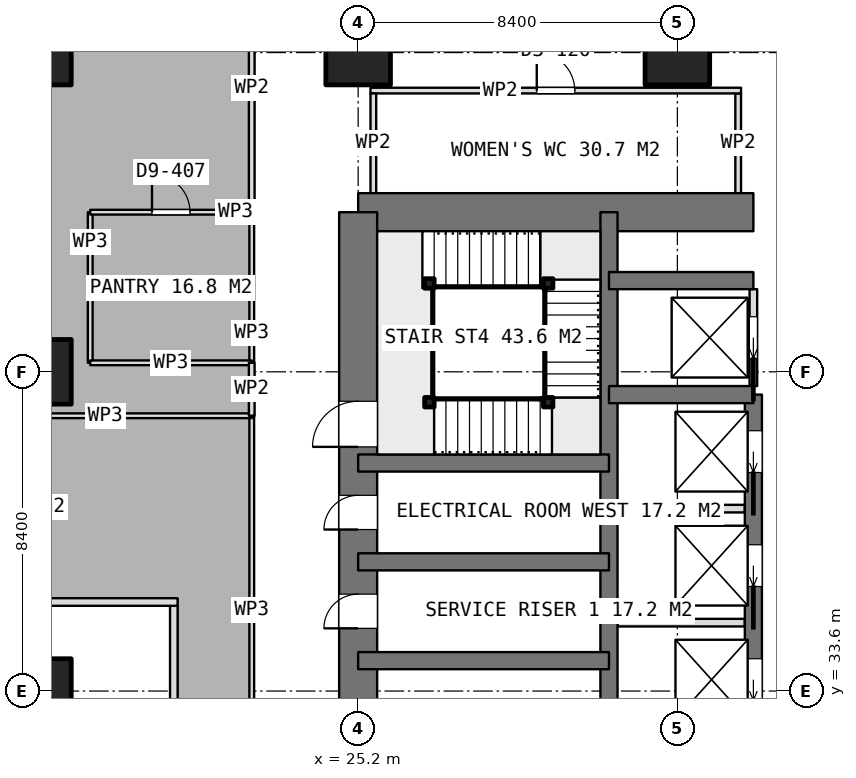
"""IFC4 building model, lengths in metres.
Left out: names, types, materials, properties, quantities, classifications, styles, units other than length and angle.
Written with IfcOpenShell. Run it as: python <this file> out.ifc"""

import sys

from ifc_helpers import new_model, si_unit, direction, frame, frame_2d, origin, origin_2d, place, context, subcontext, project, spatial, rectangle, extrude, element, fill, save


model = new_model("IFC4")
c1 = context("Model", 3, precision=1e-05, world=origin(), true_north=direction((0.0, 1.0)))
c2 = subcontext(c1, "Body", "Model", "MODEL_VIEW")
j1 = project(units=[si_unit("LENGTHUNIT", "METRE"), si_unit("PLANEANGLEUNIT", "RADIAN")], contexts=[c1])
p1 = place(None, origin())
s1 = spatial("IfcSite", under=j1, at=p1, CompositionType="ELEMENT")
p2 = place(p1, origin())
s2 = spatial("IfcBuilding", under=s1, at=p2, CompositionType="ELEMENT")
p3 = place(p2, frame((0.0, 0.0, 114.05)))
s3 = spatial("IfcBuildingStorey", under=s2, at=p3, CompositionType="ELEMENT", Elevation=114.05)
p4 = place(p3, frame((25.2, 46.2, 0.0), z_axis=(0.0, 0.0, 1.0), x_axis=(1.0, 0.0, 0.0)))
e1 = element("IfcWall", 1, at=p4, inside=s3, PredefinedType="SHEAR", context=c2, shape_type="SweptSolid", body=[
    extrude(rectangle(XDim=10.4, YDim=1.0, at=frame_2d((5.2, 0.0))), origin(), (0.0, 0.0, 1.0), 3.75),
])
p5 = place(p3, frame((25.2, 21.0, 0.0), z_axis=(0.0, 0.0, 1.0), x_axis=(0.0, 1.0, 0.0)))
e2 = element("IfcWall", 2, at=p5, inside=s3, PredefinedType="SHEAR", context=c2, shape_type="SweptSolid", body=[
    extrude(rectangle(XDim=25.2, YDim=1.0, at=frame_2d((12.6, 0.0))), origin(), (0.0, 0.0, 1.0), 3.75),
])
p6 = place(p5, frame((7.8, 0.0, 0.0)))
e3 = element("IfcOpeningElement", 3, at=p6, cuts=e2, PredefinedType="OPENING", context=c2, shape_type="SweptSolid", body=[
    extrude(rectangle(XDim=1.2, YDim=2.1, at=frame_2d((0.6, 1.05))), frame((0.0, 0.51, 0.0), z_axis=(0.0, -1.0, 0.0), x_axis=(1.0, 0.0, 0.0)), (0.0, 0.0, 1.0), 1.02),
])
p7 = place(p5, frame((14.25, 0.0, 0.0)))
e4 = element("IfcOpeningElement", 4, at=p7, cuts=e2, PredefinedType="OPENING", context=c2, shape_type="SweptSolid", body=[
    extrude(rectangle(XDim=0.9, YDim=2.1, at=frame_2d((0.45, 1.05))), frame((0.0, 0.51, 0.0), z_axis=(0.0, -1.0, 0.0), x_axis=(1.0, 0.0, 0.0)), (0.0, 0.0, 1.0), 1.02),
])
p8 = place(p5, frame((16.85, 0.0, 0.0)))
e5 = element("IfcOpeningElement", 5, at=p8, cuts=e2, PredefinedType="OPENING", context=c2, shape_type="SweptSolid", body=[
    extrude(rectangle(XDim=0.9, YDim=2.1, at=frame_2d((0.45, 1.05))), frame((0.0, 0.51, 0.0), z_axis=(0.0, -1.0, 0.0), x_axis=(1.0, 0.0, 0.0)), (0.0, 0.0, 1.0), 1.02),
])
p9 = place(p5, frame((19.025, 0.0, 0.0)))
e6 = element("IfcOpeningElement", 6, at=p9, cuts=e2, PredefinedType="OPENING", context=c2, shape_type="SweptSolid", body=[
    extrude(rectangle(XDim=1.2, YDim=2.1, at=frame_2d((0.6, 1.05))), frame((0.0, 0.51, 0.0), z_axis=(0.0, -1.0, 0.0), x_axis=(1.0, 0.0, 0.0)), (0.0, 0.0, 1.0), 1.02),
])
p10 = place(p3, frame((31.8, 21.0, 0.0), z_axis=(0.0, 0.0, 1.0), x_axis=(0.0, 1.0, 0.0)))
e7 = element("IfcWall", 7, at=p10, inside=s3, PredefinedType="SHEAR", context=c2, shape_type="SweptSolid", body=[
    extrude(rectangle(XDim=25.2, YDim=0.45, at=frame_2d((12.6, 0.0))), origin(), (0.0, 0.0, 1.0), 3.75),
])
p11 = place(p3, frame((35.6, 23.4, 0.0), z_axis=(0.0, 0.0, 1.0), x_axis=(0.0, 1.0, 0.0)))
e8 = element("IfcWall", 8, at=p11, inside=s3, PredefinedType="SHEAR", context=c2, shape_type="SweptSolid", body=[
    extrude(rectangle(XDim=18.0, YDim=0.45, at=frame_2d((9.0, 0.0))), origin(), (0.0, 0.0, 1.0), 3.75),
])
p12 = place(p11, frame((0.95, 0.0, 0.0)))
e9 = element("IfcOpeningElement", 9, at=p12, cuts=e8, PredefinedType="OPENING", context=c2, shape_type="SweptSolid", body=[
    extrude(rectangle(XDim=1.1, YDim=2.1, at=frame_2d((0.55, 1.05))), frame((0.0, 0.235, 0.0), z_axis=(0.0, -1.0, 0.0), x_axis=(1.0, 0.0, 0.0)), (0.0, 0.0, 1.0), 0.47),
])
p13 = place(p11, frame((3.95, 0.0, 0.0)))
e10 = element("IfcOpeningElement", 10, at=p13, cuts=e8, PredefinedType="OPENING", context=c2, shape_type="SweptSolid", body=[
    extrude(rectangle(XDim=1.1, YDim=2.1, at=frame_2d((0.55, 1.05))), frame((0.0, 0.235, 0.0), z_axis=(0.0, -1.0, 0.0), x_axis=(1.0, 0.0, 0.0)), (0.0, 0.0, 1.0), 0.47),
])
p14 = place(p11, frame((6.95, 0.0, 0.0)))
e11 = element("IfcOpeningElement", 11, at=p14, cuts=e8, PredefinedType="OPENING", context=c2, shape_type="SweptSolid", body=[
    extrude(rectangle(XDim=1.1, YDim=2.1, at=frame_2d((0.55, 1.05))), frame((0.0, 0.235, 0.0), z_axis=(0.0, -1.0, 0.0), x_axis=(1.0, 0.0, 0.0)), (0.0, 0.0, 1.0), 0.47),
])
p15 = place(p11, frame((9.95, 0.0, 0.0)))
e12 = element("IfcOpeningElement", 12, at=p15, cuts=e8, PredefinedType="OPENING", context=c2, shape_type="SweptSolid", body=[
    extrude(rectangle(XDim=1.1, YDim=2.1, at=frame_2d((0.55, 1.05))), frame((0.0, 0.235, 0.0), z_axis=(0.0, -1.0, 0.0), x_axis=(1.0, 0.0, 0.0)), (0.0, 0.0, 1.0), 0.47),
])
p16 = place(p11, frame((12.95, 0.0, 0.0)))
e13 = element("IfcOpeningElement", 13, at=p16, cuts=e8, PredefinedType="OPENING", context=c2, shape_type="SweptSolid", body=[
    extrude(rectangle(XDim=1.1, YDim=2.1, at=frame_2d((0.55, 1.05))), frame((0.0, 0.235, 0.0), z_axis=(0.0, -1.0, 0.0), x_axis=(1.0, 0.0, 0.0)), (0.0, 0.0, 1.0), 0.47),
])
p17 = place(p11, frame((15.95, 0.0, 0.0)))
e14 = element("IfcOpeningElement", 14, at=p17, cuts=e8, PredefinedType="OPENING", context=c2, shape_type="SweptSolid", body=[
    extrude(rectangle(XDim=1.1, YDim=2.1, at=frame_2d((0.55, 1.05))), frame((0.0, 0.235, 0.0), z_axis=(0.0, -1.0, 0.0), x_axis=(1.0, 0.0, 0.0)), (0.0, 0.0, 1.0), 0.47),
])
for number, where, z_axis, x_axis in (
    (15, (31.8, 41.4, 0.0), (0.0, 0.0, 1.0), (1.0, 0.0, 0.0)),
    (16, (31.8, 44.4, 0.0), (0.0, 0.0, 1.0), (1.0, 0.0, 0.0)),
):
    element("IfcWall", number, at=place(p3, frame(where, z_axis=z_axis, x_axis=x_axis)), inside=s3, PredefinedType="SHEAR", context=c2, shape_type="SweptSolid", body=[
        extrude(rectangle(XDim=3.8, YDim=0.45, at=frame_2d((1.9, 0.0))), origin(), (0.0, 0.0, 1.0), 3.75),
    ])
for number, where, z_axis, x_axis in (
    (17, (25.2, 34.4, 0.0), (0.0, 0.0, 1.0), (1.0, 0.0, 0.0)),
    (18, (25.2, 37.0, 0.0), (0.0, 0.0, 1.0), (1.0, 0.0, 0.0)),
    (19, (25.2, 39.6, 0.0), (0.0, 0.0, 1.0), (1.0, 0.0, 0.0)),
):
    element("IfcWall", number, at=place(p3, frame(where, z_axis=z_axis, x_axis=x_axis)), inside=s3, PredefinedType="SHEAR", context=c2, shape_type="SweptSolid", body=[
        extrude(rectangle(XDim=6.6, YDim=0.45, at=frame_2d((3.3, 0.0))), origin(), (0.0, 0.0, 1.0), 3.75),
    ])
for number, where, z_axis, x_axis in (
    (20, (16.8, 33.6, 0.0), (0.0, 0.0, 1.0), (1.0, 0.0, 0.0)),
    (21, (16.8, 42.0, 0.0), (0.0, 0.0, 1.0), (1.0, 0.0, 0.0)),
    (22, (16.8, 50.4, 0.0), (0.0, 0.0, 1.0), (1.0, 0.0, 0.0)),
    (23, (25.2, 50.4, 0.0), (0.0, 0.0, 1.0), (1.0, 0.0, 0.0)),
    (24, (33.6, 50.4, 0.0), (0.0, 0.0, 1.0), (1.0, 0.0, 0.0)),
):
    element("IfcColumn", number, at=place(p3, frame(where, z_axis=z_axis, x_axis=x_axis)), inside=s3, PredefinedType="COLUMN", context=c2, shape_type="SweptSolid", body=[
        extrude(rectangle(XDim=1.7, YDim=1.7, at=origin_2d()), origin(), (0.0, 0.0, 1.0), 3.75),
    ])
for number, where, z_axis, x_axis in (
    (25, (32.025, 35.4, 0.0), (0.0, 0.0, 1.0), (1.0, 0.0, 0.0)),
    (26, (32.025, 38.4, 0.0), (0.0, 0.0, 1.0), (1.0, 0.0, 0.0)),
):
    element("IfcWall", number, at=place(p3, frame(where, z_axis=z_axis, x_axis=x_axis)), inside=s3, PredefinedType="PARTITIONING", context=c2, shape_type="SweptSolid", body=[
        extrude(rectangle(XDim=3.35, YDim=0.2, at=frame_2d((1.675, 0.0))), origin(), (0.0, 0.0, 1.0), 3.5),
    ])
p18 = place(p3, frame((35.6, 41.625, 0.0), z_axis=(0.0, 0.0, 1.0), x_axis=(0.0, 1.0, 0.0)))
e27 = element("IfcWall", 27, at=p18, inside=s3, PredefinedType="PARTITIONING", context=c2, shape_type="SweptSolid", body=[
    extrude(rectangle(XDim=2.55, YDim=0.2, at=frame_2d((1.275, 0.0))), origin(), (0.0, 0.0, 1.0), 3.5),
])
p19 = place(p18, frame((0.725, 0.0, 0.0)))
e28 = element("IfcOpeningElement", 28, at=p19, cuts=e27, PredefinedType="OPENING", context=c2, shape_type="SweptSolid", body=[
    extrude(rectangle(XDim=1.1, YDim=2.1, at=frame_2d((0.55, 1.05))), frame((0.0, 0.11, 0.0), z_axis=(0.0, -1.0, 0.0), x_axis=(1.0, 0.0, 0.0)), (0.0, 0.0, 1.0), 0.22),
])
p20 = place(p3, frame((25.525, 49.4, 0.0), z_axis=(0.0, 0.0, 1.0), x_axis=(1.0, 0.0, 0.0)))
e29 = element("IfcWall", 29, at=p20, inside=s3, PredefinedType="PARTITIONING", context=c2, shape_type="SweptSolid", body=[
    extrude(rectangle(XDim=9.75, YDim=0.15, at=frame_2d((4.875, 0.0))), origin(), (0.0, 0.0, 1.0), 3.5),
])
p21 = place(p20, frame((4.375, 0.0, 0.0)))
e30 = element("IfcOpeningElement", 30, at=p21, cuts=e29, PredefinedType="OPENING", context=c2, shape_type="SweptSolid", body=[
    extrude(rectangle(XDim=1.0, YDim=2.1, at=frame_2d((0.5, 1.05))), frame((0.0, 0.085, 0.0), z_axis=(0.0, -1.0, 0.0), x_axis=(1.0, 0.0, 0.0)), (0.0, 0.0, 1.0), 0.17),
])
for number, where, z_axis, x_axis in (
    (31, (25.6, 46.7, 0.0), (0.0, 0.0, 1.0), (0.0, 1.0, 0.0)),
    (32, (35.2, 46.7, 0.0), (0.0, 0.0, 1.0), (0.0, 1.0, 0.0)),
):
    element("IfcWall", number, at=place(p3, frame(where, z_axis=z_axis, x_axis=x_axis)), inside=s3, PredefinedType="PARTITIONING", context=c2, shape_type="SweptSolid", body=[
        extrude(rectangle(XDim=2.625, YDim=0.15, at=frame_2d((1.312, 0.0))), origin(), (0.0, 0.0, 1.0), 3.5),
    ])
p22 = place(p3, frame((22.4, 40.844, 0.0), z_axis=(0.0, 0.0, 1.0), x_axis=(0.0, -1.0, 0.0)))
e33 = element("IfcWall", 33, at=p22, inside=s3, PredefinedType="PARTITIONING", context=c2, shape_type="SweptSolid", body=[
    extrude(rectangle(XDim=10.233, YDim=0.125, at=frame_2d((5.116, 0.0))), origin(), (0.0, 0.0, 1.0), 3.5),
])
p23 = place(p3, frame((11.386, 40.844, 0.0), z_axis=(0.0, 0.0, 1.0), x_axis=(1.0, 0.0, 0.0)))
e34 = element("IfcWall", 34, at=p23, inside=s3, PredefinedType="PARTITIONING", context=c2, shape_type="SweptSolid", body=[
    extrude(rectangle(XDim=11.014, YDim=0.125, at=frame_2d((5.507, 0.0))), origin(), (0.0, 0.0, 1.0), 3.5),
])
p24 = place(p23, frame((2.478, 0.0, 0.0)))
e35 = element("IfcOpeningElement", 35, at=p24, cuts=e34, PredefinedType="OPENING", context=c2, shape_type="SweptSolid", body=[
    extrude(rectangle(XDim=1.8, YDim=2.1, at=frame_2d((0.9, 1.05))), frame((0.0, 0.073, 0.0), z_axis=(0.0, -1.0, 0.0), x_axis=(1.0, 0.0, 0.0)), (0.0, 0.0, 1.0), 0.145),
])
p25 = place(p3, frame((18.15, 42.237, 0.0), z_axis=(0.0, 0.0, 1.0), x_axis=(0.0, 1.0, 0.0)))
e36 = element("IfcWall", 36, at=p25, inside=s3, PredefinedType="PARTITIONING", context=c2, shape_type="SweptSolid", body=[
    extrude(rectangle(XDim=3.963, YDim=0.125, at=frame_2d((1.981, 0.0))), origin(), (0.0, 0.0, 1.0), 3.5),
])
p26 = place(p3, frame((18.15, 46.2, 0.0), z_axis=(0.0, 0.0, 1.0), x_axis=(1.0, 0.0, 0.0)))
e37 = element("IfcWall", 37, at=p26, inside=s3, PredefinedType="PARTITIONING", context=c2, shape_type="SweptSolid", body=[
    extrude(rectangle(XDim=4.25, YDim=0.125, at=frame_2d((2.125, 0.0))), origin(), (0.0, 0.0, 1.0), 3.5),
])
p27 = place(p26, frame((1.625, 0.0, 0.0)))
e38 = element("IfcOpeningElement", 38, at=p27, cuts=e37, PredefinedType="OPENING", context=c2, shape_type="SweptSolid", body=[
    extrude(rectangle(XDim=1.0, YDim=2.1, at=frame_2d((0.5, 1.05))), frame((0.0, 0.073, 0.0), z_axis=(0.0, -1.0, 0.0), x_axis=(1.0, 0.0, 0.0)), (0.0, 0.0, 1.0), 0.145),
])
p28 = place(p3, frame((22.4, 46.2, 0.0), z_axis=(0.0, 0.0, 1.0), x_axis=(0.0, -1.0, 0.0)))
e39 = element("IfcWall", 39, at=p28, inside=s3, PredefinedType="PARTITIONING", context=c2, shape_type="SweptSolid", body=[
    extrude(rectangle(XDim=3.963, YDim=0.125, at=frame_2d((1.981, 0.0))), origin(), (0.0, 0.0, 1.0), 3.5),
])
p29 = place(p3, frame((22.4, 42.237, 0.0), z_axis=(0.0, 0.0, 1.0), x_axis=(-1.0, 0.0, 0.0)))
e40 = element("IfcWall", 40, at=p29, inside=s3, PredefinedType="PARTITIONING", context=c2, shape_type="SweptSolid", body=[
    extrude(rectangle(XDim=4.25, YDim=0.125, at=frame_2d((2.125, 0.0))), origin(), (0.0, 0.0, 1.0), 3.5),
])
p30 = place(p3, frame((22.4, 52.75, 0.0), z_axis=(0.0, 0.0, 1.0), x_axis=(0.0, -1.0, 0.0)))
e41 = element("IfcWall", 41, at=p30, inside=s3, PredefinedType="PARTITIONING", context=c2, shape_type="SweptSolid", body=[
    extrude(rectangle(XDim=6.55, YDim=0.15, at=frame_2d((3.275, 0.0))), origin(), (0.0, 0.0, 1.0), 3.5),
])
p31 = place(p3, frame((22.4, 42.237, 0.0), z_axis=(0.0, 0.0, 1.0), x_axis=(0.0, -1.0, 0.0)))
e42 = element("IfcWall", 42, at=p31, inside=s3, PredefinedType="PARTITIONING", context=c2, shape_type="SweptSolid", body=[
    extrude(rectangle(XDim=1.393, YDim=0.15, at=frame_2d((0.697, 0.0))), origin(), (0.0, 0.0, 1.0), 3.5),
])
for number, where, z_axis, x_axis in (
    (43, (27.075, 41.2, 0.0), (0.0, 0.0, 1.0), (1.0, 0.0, 0.0)),
    (44, (30.2, 41.2, 0.0), (0.0, 0.0, 1.0), (1.0, 0.0, 0.0)),
    (45, (30.2, 44.325, 0.0), (0.0, 0.0, 1.0), (1.0, 0.0, 0.0)),
    (46, (27.075, 44.325, 0.0), (0.0, 0.0, 1.0), (1.0, 0.0, 0.0)),
):
    element("IfcColumn", number, at=place(p3, frame(where, z_axis=z_axis, x_axis=x_axis)), inside=s3, PredefinedType="COLUMN", context=c2, shape_type="SweptSolid", body=[
        extrude(rectangle(XDim=0.25, YDim=0.25, at=origin_2d()), origin(), (0.0, 0.0, 1.0), 3.75),
    ])
p32 = place(p3, frame((20.35, 15.248, 0.0), z_axis=(0.0, 0.0, 1.0), x_axis=(0.0, 1.0, 0.0)))
e47 = element("IfcWall", 47, at=p32, inside=s3, PredefinedType="PARTITIONING", context=c2, shape_type="SweptSolid", body=[
    extrude(rectangle(XDim=20.595, YDim=0.2, at=frame_2d((10.297, 0.0))), origin(), (0.0, 0.0, 1.0), 3.5),
])
p33 = place(p32, frame((13.552, 0.0, 0.0)))
e48 = element("IfcOpeningElement", 48, at=p33, cuts=e47, PredefinedType="OPENING", context=c2, shape_type="SweptSolid", body=[
    extrude(rectangle(XDim=1.2, YDim=2.1, at=frame_2d((0.6, 1.05))), frame((0.0, 0.11, 0.0), z_axis=(0.0, -1.0, 0.0), x_axis=(1.0, 0.0, 0.0)), (0.0, 0.0, 1.0), 0.22),
])
p34 = place(p3, frame((5.348, 35.943, 0.0), z_axis=(0.0, 0.0, 1.0), x_axis=(1.0, 0.0, 0.0)))
e49 = element("IfcWall", 49, at=p34, inside=s3, PredefinedType="PARTITIONING", context=c2, shape_type="SweptSolid", body=[
    extrude(rectangle(XDim=15.102, YDim=0.2, at=frame_2d((7.551, 0.0))), origin(), (0.0, 0.0, 1.0), 3.5),
])
p35 = place(p7, origin())
e50 = element("IfcDoor", 50, at=p35, inside=s3, OperationType="SINGLE_SWING_LEFT", PredefinedType="DOOR", context=c2, shape_type="SweptSolid", body=[
    extrude(rectangle(XDim=0.9, YDim=2.1, at=frame_2d((0.45, 1.05))), frame((0.0, 0.025, 0.0), z_axis=(0.0, -1.0, 0.0), x_axis=(1.0, 0.0, 0.0)), (0.0, 0.0, 1.0), 0.05),
])
fill(e4, e50)
p36 = place(p8, origin())
e51 = element("IfcDoor", 51, at=p36, inside=s3, OperationType="SINGLE_SWING_LEFT", PredefinedType="DOOR", context=c2, shape_type="SweptSolid", body=[
    extrude(rectangle(XDim=0.9, YDim=2.1, at=frame_2d((0.45, 1.05))), frame((0.0, 0.025, 0.0), z_axis=(0.0, -1.0, 0.0), x_axis=(1.0, 0.0, 0.0)), (0.0, 0.0, 1.0), 0.05),
])
fill(e5, e51)
p37 = place(p15, origin())
e52 = element("IfcDoor", 52, at=p37, inside=s3, OperationType="SLIDING_TO_LEFT", PredefinedType="USERDEFINED", context=c2, shape_type="SweptSolid", body=[
    extrude(rectangle(XDim=1.1, YDim=2.1, at=frame_2d((0.55, 1.05))), frame((0.0, 0.025, 0.0), z_axis=(0.0, -1.0, 0.0), x_axis=(1.0, 0.0, 0.0)), (0.0, 0.0, 1.0), 0.05),
])
fill(e12, e52)
p38 = place(p16, origin())
e53 = element("IfcDoor", 53, at=p38, inside=s3, OperationType="SLIDING_TO_LEFT", PredefinedType="USERDEFINED", context=c2, shape_type="SweptSolid", body=[
    extrude(rectangle(XDim=1.1, YDim=2.1, at=frame_2d((0.55, 1.05))), frame((0.0, 0.025, 0.0), z_axis=(0.0, -1.0, 0.0), x_axis=(1.0, 0.0, 0.0)), (0.0, 0.0, 1.0), 0.05),
])
fill(e13, e53)
p39 = place(p17, origin())
e54 = element("IfcDoor", 54, at=p39, inside=s3, OperationType="SLIDING_TO_LEFT", PredefinedType="USERDEFINED", context=c2, shape_type="SweptSolid", body=[
    extrude(rectangle(XDim=1.1, YDim=2.1, at=frame_2d((0.55, 1.05))), frame((0.0, 0.025, 0.0), z_axis=(0.0, -1.0, 0.0), x_axis=(1.0, 0.0, 0.0)), (0.0, 0.0, 1.0), 0.05),
])
fill(e14, e54)
p40 = place(p19, origin())
e55 = element("IfcDoor", 55, at=p40, inside=s3, OperationType="SLIDING_TO_LEFT", PredefinedType="USERDEFINED", context=c2, shape_type="SweptSolid", body=[
    extrude(rectangle(XDim=1.1, YDim=2.1, at=frame_2d((0.55, 1.05))), frame((0.0, 0.025, 0.0), z_axis=(0.0, -1.0, 0.0), x_axis=(1.0, 0.0, 0.0)), (0.0, 0.0, 1.0), 0.05),
])
fill(e28, e55)
p41 = place(p21, origin())
e56 = element("IfcDoor", 56, at=p41, inside=s3, OperationType="SINGLE_SWING_LEFT", PredefinedType="DOOR", context=c2, shape_type="SweptSolid", body=[
    extrude(rectangle(XDim=1.0, YDim=2.1, at=frame_2d((0.5, 1.05))), frame((0.0, 0.025, 0.0), z_axis=(0.0, -1.0, 0.0), x_axis=(1.0, 0.0, 0.0)), (0.0, 0.0, 1.0), 0.05),
])
fill(e30, e56)
p42 = place(p27, origin())
e57 = element("IfcDoor", 57, at=p42, inside=s3, OperationType="SINGLE_SWING_LEFT", PredefinedType="DOOR", context=c2, shape_type="SweptSolid", body=[
    extrude(rectangle(XDim=1.0, YDim=2.1, at=frame_2d((0.5, 1.05))), frame((0.0, 0.025, 0.0), z_axis=(0.0, -1.0, 0.0), x_axis=(1.0, 0.0, 0.0)), (0.0, 0.0, 1.0), 0.05),
])
fill(e38, e57)
p43 = place(p9, origin())
e58 = element("IfcDoor", 58, at=p43, inside=s3, OperationType="SINGLE_SWING_RIGHT", PredefinedType="DOOR", context=c2, shape_type="SweptSolid", body=[
    extrude(rectangle(XDim=1.2, YDim=2.1, at=frame_2d((0.6, 1.05))), frame((0.0, 0.025, 0.0), z_axis=(0.0, -1.0, 0.0), x_axis=(1.0, 0.0, 0.0)), (0.0, 0.0, 1.0), 0.05),
])
fill(e6, e58)
save(model, sys.argv[1])
